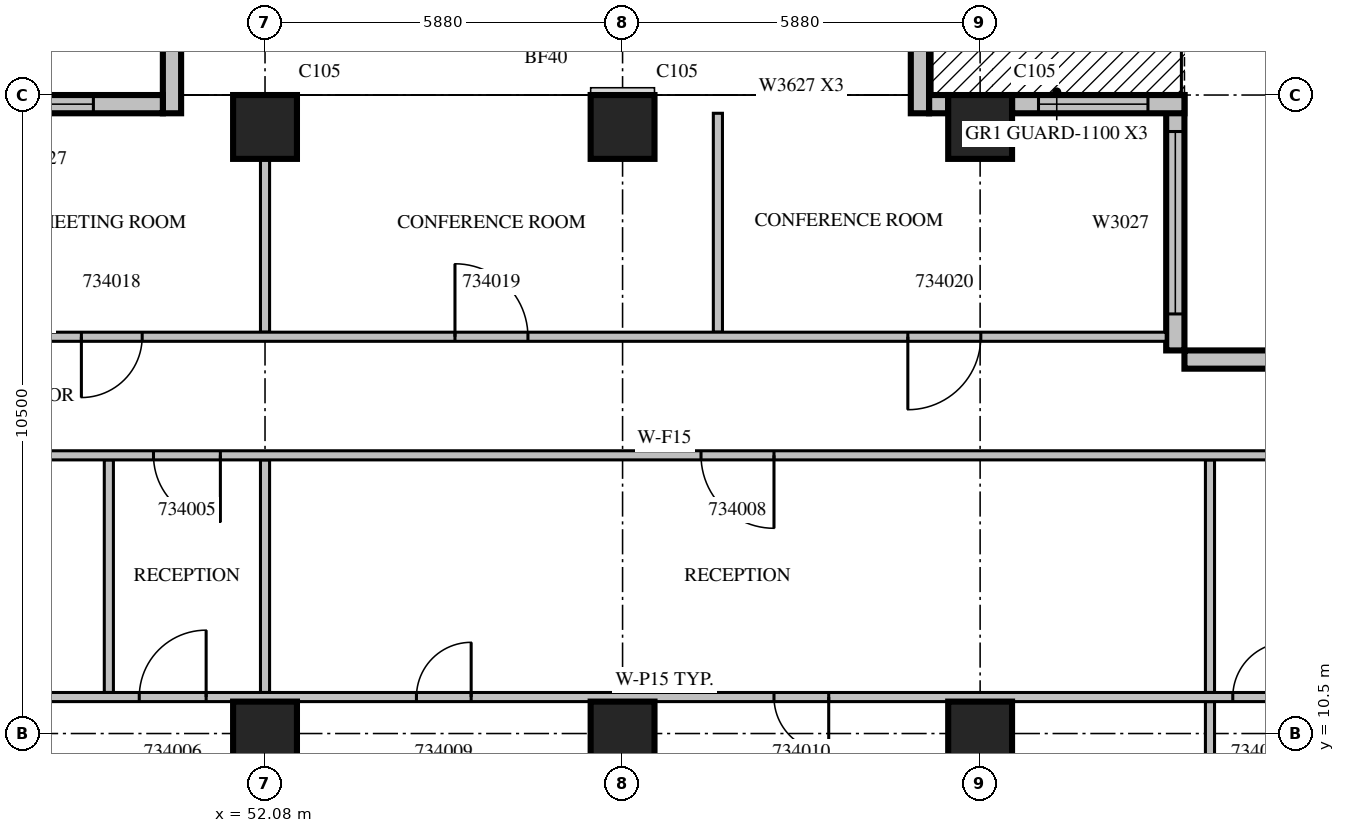
"""IFC4 building model, lengths in metres.
Left out: names, types, materials, properties, quantities, classifications, styles, units other than length and angle.
Written with IfcOpenShell. Run it as: python <this file> out.ifc"""

import sys

from ifc_helpers import new_model, si_unit, direction, frame, frame_2d, origin, origin_2d, place, context, subcontext, project, spatial, rectangle, extrude, source, transform, mapped, element, fill, save


model = new_model("IFC4")
c1 = context("Model", 3, precision=1e-05, world=origin(), true_north=direction((0.0, 1.0)))
c2 = subcontext(c1, "Body", "Model", "MODEL_VIEW")
j1 = project(units=[si_unit("LENGTHUNIT", "METRE"), si_unit("PLANEANGLEUNIT", "RADIAN")], contexts=[c1])
p1 = place(None, origin())
s1 = spatial("IfcSite", under=j1, at=p1, CompositionType="ELEMENT")
p2 = place(p1, origin())
s2 = spatial("IfcBuilding", under=s1, at=p2, CompositionType="ELEMENT")
p3 = place(p2, frame((0.0, 0.0, 153.9)))
s3 = spatial("IfcBuildingStorey", under=s2, at=p3, CompositionType="ELEMENT", Elevation=153.9)
m1 = source(origin(), c2, "Body", "SweptSolid", [
    extrude(rectangle(XDim=1.05, YDim=1.05, at=origin_2d()), origin(), (0.0, 0.0, 1.0), 4.2),
])
for number, where, z_axis, x_axis in (
    (1, (52.08, 10.5, 0.0), (0.0, 0.0, 1.0), (1.0, 0.0, 0.0)),
    (2, (57.96, 10.5, 0.0), (0.0, 0.0, 1.0), (1.0, 0.0, 0.0)),
    (3, (63.84, 10.5, 0.0), (0.0, 0.0, 1.0), (1.0, 0.0, 0.0)),
    (4, (52.08, 20.475, 0.0), (0.0, 0.0, 1.0), (1.0, 0.0, 0.0)),
    (5, (57.96, 20.475, 0.0), (0.0, 0.0, 1.0), (1.0, 0.0, 0.0)),
    (6, (63.84, 20.475, 0.0), (0.0, 0.0, 1.0), (1.0, 0.0, 0.0)),
):
    element("IfcColumn", number, at=place(p3, frame(where, z_axis=z_axis, x_axis=x_axis)), inside=s3, PredefinedType="COLUMN", context=c2, shape_type="MappedRepresentation", body=[
        mapped(m1, transform((0.0, 0.0, 0.0), scale=1.0)),
    ])
m2 = source(origin(), c2, "Body", "SweptSolid", [
    extrude(rectangle(XDim=4.2, YDim=0.3, at=frame_2d((2.1, 0.0))), origin(), (0.0, 0.0, 1.0), 3.8),
])
p4 = place(p3, frame((71.4, 16.65, 0.0), z_axis=(0.0, 0.0, 1.0), x_axis=(-1.0, 0.0, 0.0)))
e7 = element("IfcWall", 7, at=p4, inside=s3, PredefinedType="STANDARD", context=c2, shape_type="MappedRepresentation", body=[
    mapped(m2, transform((0.0, 0.0, 0.0), scale=1.0)),
])
m3 = source(origin(), c2, "Body", "SweptSolid", [
    extrude(rectangle(XDim=1.2, YDim=2.7, at=frame_2d((0.6, 1.35))), frame((0.0, 0.16, 0.0), z_axis=(0.0, -1.0, 0.0), x_axis=(1.0, 0.0, 0.0)), (0.0, 0.0, 1.0), 0.32),
])
p5 = place(p4, frame((0.66, 0.0, 0.6)))
e8 = element("IfcOpeningElement", 8, at=p5, cuts=e7, PredefinedType="OPENING", context=c2, shape_type="MappedRepresentation", body=[
    mapped(m3, transform((0.0, 0.0, 0.0), scale=1.0)),
])
p6 = place(p3, frame((67.05, 16.8, 0.0), z_axis=(0.0, 0.0, 1.0), x_axis=(0.0, 1.0, 0.0)))
e9 = element("IfcWall", 9, at=p6, inside=s3, PredefinedType="STANDARD", context=c2, shape_type="MappedRepresentation", body=[
    mapped(m2, transform((0.0, 0.0, 0.0), scale=1.0)),
])
m4 = source(origin(), c2, "Body", "SweptSolid", [
    extrude(rectangle(XDim=3.0, YDim=2.7, at=frame_2d((1.5, 1.35))), frame((0.0, 0.16, 0.0), z_axis=(0.0, -1.0, 0.0), x_axis=(1.0, 0.0, 0.0)), (0.0, 0.0, 1.0), 0.32),
])
p7 = place(p6, frame((0.6, 0.0, 0.6)))
e10 = element("IfcOpeningElement", 10, at=p7, cuts=e9, PredefinedType="OPENING", context=c2, shape_type="MappedRepresentation", body=[
    mapped(m4, transform((0.0, 0.0, 0.0), scale=1.0)),
])
m5 = source(origin(), c2, "Body", "SweptSolid", [
    extrude(rectangle(XDim=2.835, YDim=0.3, at=frame_2d((1.417, 0.0))), origin(), (0.0, 0.0, 1.0), 3.8),
])
p8 = place(p3, frame((67.2, 20.85, 0.0), z_axis=(0.0, 0.0, 1.0), x_axis=(-1.0, 0.0, 0.0)))
e11 = element("IfcWall", 11, at=p8, inside=s3, PredefinedType="STANDARD", context=c2, shape_type="MappedRepresentation", body=[
    mapped(m5, transform((0.0, 0.0, 0.0), scale=1.0)),
])
m6 = source(origin(), c2, "Body", "SweptSolid", [
    extrude(rectangle(XDim=1.8, YDim=2.4, at=frame_2d((0.9, 1.2))), frame((0.0, 0.16, 0.0), z_axis=(0.0, -1.0, 0.0), x_axis=(1.0, 0.0, 0.0)), (0.0, 0.0, 1.0), 0.32),
])
p9 = place(p8, frame((0.6, 0.0, 0.0)))
e12 = element("IfcOpeningElement", 12, at=p9, cuts=e11, PredefinedType="OPENING", context=c2, shape_type="MappedRepresentation", body=[
    mapped(m6, transform((0.0, 0.0, 0.0), scale=1.0)),
])
m7 = source(origin(), c2, "Body", "SweptSolid", [
    extrude(rectangle(XDim=0.315, YDim=0.3, at=frame_2d((0.158, 0.0))), origin(), (0.0, 0.0, 1.0), 3.8),
])
p10 = place(p3, frame((63.315, 20.85, 0.0), z_axis=(0.0, 0.0, 1.0), x_axis=(-1.0, 0.0, 0.0)))
e13 = element("IfcWall", 13, at=p10, inside=s3, PredefinedType="STANDARD", context=c2, shape_type="MappedRepresentation", body=[
    mapped(m7, transform((0.0, 0.0, 0.0), scale=1.0)),
])
m8 = source(origin(), c2, "Body", "SweptSolid", [
    extrude(rectangle(XDim=1.2, YDim=0.3, at=frame_2d((0.6, 0.0))), origin(), (0.0, 0.0, 1.0), 3.8),
])
for number, where, z_axis, x_axis in (
    (14, (62.85, 20.7, 0.0), (0.0, 0.0, 1.0), (0.0, 1.0, 0.0)),
    (15, (50.55, 20.7, 0.0), (0.0, 0.0, 1.0), (0.0, 1.0, 0.0)),
):
    element("IfcWall", number, at=place(p3, frame(where, z_axis=z_axis, x_axis=x_axis)), inside=s3, PredefinedType="STANDARD", context=c2, shape_type="MappedRepresentation", body=[
        mapped(m8, transform((0.0, 0.0, 0.0), scale=1.0)),
    ])
m9 = source(origin(), c2, "Body", "SweptSolid", [
    extrude(rectangle(XDim=3.675, YDim=0.3, at=frame_2d((1.837, 0.0))), origin(), (0.0, 0.0, 1.0), 3.8),
])
p11 = place(p3, frame((50.4, 20.85, 0.0), z_axis=(0.0, 0.0, 1.0), x_axis=(-1.0, 0.0, 0.0)))
e16 = element("IfcWall", 16, at=p11, inside=s3, PredefinedType="STANDARD", context=c2, shape_type="MappedRepresentation", body=[
    mapped(m9, transform((0.0, 0.0, 0.0), scale=1.0)),
])
m10 = source(origin(), c2, "Body", "SweptSolid", [
    extrude(rectangle(XDim=1.8, YDim=2.7, at=frame_2d((0.9, 1.35))), frame((0.0, 0.16, 0.0), z_axis=(0.0, -1.0, 0.0), x_axis=(1.0, 0.0, 0.0)), (0.0, 0.0, 1.0), 0.32),
])
p12 = place(p11, frame((1.143, 0.0, 0.6)))
e17 = element("IfcOpeningElement", 17, at=p12, cuts=e16, PredefinedType="OPENING", context=c2, shape_type="MappedRepresentation", body=[
    mapped(m10, transform((0.0, 0.0, 0.0), scale=1.0)),
])
m11 = source(origin(), c2, "Body", "SweptSolid", [
    extrude(rectangle(XDim=3.825, YDim=0.15, at=frame_2d((1.913, 0.0))), origin(), (0.0, 0.0, 1.0), 3.8),
])
for number, where, z_axis, x_axis in (
    (18, (49.512, 11.175, 0.0), (0.0, 0.0, 1.0), (0.0, 1.0, 0.0)),
    (19, (52.08, 11.175, 0.0), (0.0, 0.0, 1.0), (0.0, 1.0, 0.0)),
):
    element("IfcWall", number, at=place(p3, frame(where, z_axis=z_axis, x_axis=x_axis)), inside=s3, PredefinedType="PARTITIONING", context=c2, shape_type="MappedRepresentation", body=[
        mapped(m11, transform((0.0, 0.0, 0.0), scale=1.0)),
    ])
m12 = source(origin(), c2, "Body", "SweptSolid", [
    extrude(rectangle(XDim=6.62, YDim=0.15, at=frame_2d((3.31, 0.0))), origin(), (0.0, 0.0, 1.0), 3.8),
])
p13 = place(p3, frame((67.62, 4.405, 0.0), z_axis=(0.0, 0.0, 1.0), x_axis=(0.0, 1.0, 0.0)))
e20 = element("IfcWall", 20, at=p13, inside=s3, PredefinedType="PARTITIONING", context=c2, shape_type="MappedRepresentation", body=[
    mapped(m12, transform((0.0, 0.0, 0.0), scale=1.0)),
])
p14 = place(p3, frame((67.62, 11.175, 0.0), z_axis=(0.0, 0.0, 1.0), x_axis=(0.0, 1.0, 0.0)))
e21 = element("IfcWall", 21, at=p14, inside=s3, PredefinedType="PARTITIONING", context=c2, shape_type="MappedRepresentation", body=[
    mapped(m11, transform((0.0, 0.0, 0.0), scale=1.0)),
])
m13 = source(origin(), c2, "Body", "SweptSolid", [
    extrude(rectangle(XDim=24.9, YDim=0.15, at=frame_2d((12.45, 0.0))), origin(), (0.0, 0.0, 1.0), 3.8),
])
p15 = place(p3, frame((71.1, 11.1, 0.0), z_axis=(0.0, 0.0, 1.0), x_axis=(-1.0, 0.0, 0.0)))
e22 = element("IfcWall", 22, at=p15, inside=s3, PredefinedType="PARTITIONING", context=c2, shape_type="MappedRepresentation", body=[
    mapped(m13, transform((0.0, 0.0, 0.0), scale=1.0)),
])
m14 = source(origin(), c2, "Body", "SweptSolid", [
    extrude(rectangle(XDim=1.1, YDim=2.1, at=frame_2d((0.55, 1.05))), frame((0.0, 0.085, 0.0), z_axis=(0.0, -1.0, 0.0), x_axis=(1.0, 0.0, 0.0)), (0.0, 0.0, 1.0), 0.17),
])
p16 = place(p15, frame((19.988, 0.0, 0.0)))
e23 = element("IfcOpeningElement", 23, at=p16, cuts=e22, PredefinedType="OPENING", context=c2, shape_type="MappedRepresentation", body=[
    mapped(m14, transform((0.0, 0.0, 0.0), scale=1.0)),
])
m15 = source(origin(), c2, "Body", "SweptSolid", [
    extrude(rectangle(XDim=0.9, YDim=2.1, at=frame_2d((0.45, 1.05))), frame((0.0, 0.085, 0.0), z_axis=(0.0, -1.0, 0.0), x_axis=(1.0, 0.0, 0.0)), (0.0, 0.0, 1.0), 0.17),
])
p17 = place(p15, frame((15.63, 0.0, 0.0)))
e24 = element("IfcOpeningElement", 24, at=p17, cuts=e22, PredefinedType="OPENING", context=c2, shape_type="MappedRepresentation", body=[
    mapped(m15, transform((0.0, 0.0, 0.0), scale=1.0)),
])
p18 = place(p15, frame((9.75, 0.0, 0.0)))
e25 = element("IfcOpeningElement", 25, at=p18, cuts=e22, PredefinedType="OPENING", context=c2, shape_type="MappedRepresentation", body=[
    mapped(m15, transform((0.0, 0.0, 0.0), scale=1.0)),
])
p19 = place(p15, frame((2.205, 0.0, 0.0)))
e26 = element("IfcOpeningElement", 26, at=p19, cuts=e22, PredefinedType="OPENING", context=c2, shape_type="MappedRepresentation", body=[
    mapped(m15, transform((0.0, 0.0, 0.0), scale=1.0)),
])
m16 = source(origin(), c2, "Body", "SweptSolid", [
    extrude(rectangle(XDim=3.6, YDim=0.15, at=frame_2d((1.8, 0.0))), origin(), (0.0, 0.0, 1.0), 3.8),
])
p20 = place(p3, frame((59.528, 20.7, 0.0), z_axis=(0.0, 0.0, 1.0), x_axis=(0.0, -1.0, 0.0)))
e27 = element("IfcWall", 27, at=p20, inside=s3, PredefinedType="PARTITIONING", context=c2, shape_type="MappedRepresentation", body=[
    mapped(m16, transform((0.0, 0.0, 0.0), scale=1.0)),
])
m17 = source(origin(), c2, "Body", "SweptSolid", [
    extrude(rectangle(XDim=2.851, YDim=0.15, at=frame_2d((1.425, 0.0))), origin(), (0.0, 0.0, 1.0), 3.8),
])
p21 = place(p3, frame((52.08, 17.1, 0.0), z_axis=(0.0, 0.0, 1.0), x_axis=(0.0, 1.0, 0.0)))
e28 = element("IfcWall", 28, at=p21, inside=s3, PredefinedType="PARTITIONING", context=c2, shape_type="MappedRepresentation", body=[
    mapped(m17, transform((0.0, 0.0, 0.0), scale=1.0)),
])
p22 = place(p3, frame((71.1, 15.075, 0.0), z_axis=(0.0, 0.0, 1.0), x_axis=(-1.0, 0.0, 0.0)))
e29 = element("IfcWall", 29, at=p22, inside=s3, PredefinedType="PARTITIONING", context=c2, shape_type="MappedRepresentation", body=[
    mapped(m13, transform((0.0, 0.0, 0.0), scale=1.0)),
])
p23 = place(p22, frame((19.754, 0.0, 0.0)))
e30 = element("IfcOpeningElement", 30, at=p23, cuts=e29, PredefinedType="OPENING", context=c2, shape_type="MappedRepresentation", body=[
    mapped(m14, transform((0.0, 0.0, 0.0), scale=1.0)),
])
p24 = place(p22, frame((22.794, 0.0, 0.0)))
e31 = element("IfcOpeningElement", 31, at=p24, cuts=e29, PredefinedType="OPENING", context=c2, shape_type="MappedRepresentation", body=[
    mapped(m15, transform((0.0, 0.0, 0.0), scale=1.0)),
])
m18 = source(origin(), c2, "Body", "SweptSolid", [
    extrude(rectangle(XDim=1.2, YDim=2.1, at=frame_2d((0.6, 1.05))), frame((0.0, 0.085, 0.0), z_axis=(0.0, -1.0, 0.0), x_axis=(1.0, 0.0, 0.0)), (0.0, 0.0, 1.0), 0.17),
])
p25 = place(p22, frame((10.65, 0.0, 0.0)))
e32 = element("IfcOpeningElement", 32, at=p25, cuts=e29, PredefinedType="OPENING", context=c2, shape_type="MappedRepresentation", body=[
    mapped(m18, transform((0.0, 0.0, 0.0), scale=1.0)),
])
p26 = place(p22, frame((1.103, 0.0, 0.0)))
e33 = element("IfcOpeningElement", 33, at=p26, cuts=e29, PredefinedType="OPENING", context=c2, shape_type="MappedRepresentation", body=[
    mapped(m18, transform((0.0, 0.0, 0.0), scale=1.0)),
])
m19 = source(origin(), c2, "Body", "SweptSolid", [
    extrude(rectangle(XDim=37.5, YDim=0.15, at=frame_2d((18.75, 0.0))), origin(), (0.0, 0.0, 1.0), 3.8),
])
p27 = place(p3, frame((29.4, 17.025, 0.0), z_axis=(0.0, 0.0, 1.0), x_axis=(1.0, 0.0, 0.0)))
e34 = element("IfcWall", 34, at=p27, inside=s3, PredefinedType="PARTITIONING", context=c2, shape_type="MappedRepresentation", body=[
    mapped(m19, transform((0.0, 0.0, 0.0), scale=1.0)),
])
m20 = source(origin(), c2, "Body", "SweptSolid", [
    extrude(rectangle(XDim=1.0, YDim=2.1, at=frame_2d((0.5, 1.05))), frame((0.0, 0.085, 0.0), z_axis=(0.0, -1.0, 0.0), x_axis=(1.0, 0.0, 0.0)), (0.0, 0.0, 1.0), 0.17),
])
p28 = place(p27, frame((1.357, 0.0, 0.0)))
e35 = element("IfcOpeningElement", 35, at=p28, cuts=e34, PredefinedType="OPENING", context=c2, shape_type="MappedRepresentation", body=[
    mapped(m20, transform((0.0, 0.0, 0.0), scale=1.0)),
])
p29 = place(p27, frame((4.669, 0.0, 0.0)))
e36 = element("IfcOpeningElement", 36, at=p29, cuts=e34, PredefinedType="OPENING", context=c2, shape_type="MappedRepresentation", body=[
    mapped(m20, transform((0.0, 0.0, 0.0), scale=1.0)),
])
p30 = place(p27, frame((7.012, 0.0, 0.0)))
e37 = element("IfcOpeningElement", 37, at=p30, cuts=e34, PredefinedType="OPENING", context=c2, shape_type="MappedRepresentation", body=[
    mapped(m20, transform((0.0, 0.0, 0.0), scale=1.0)),
])
p31 = place(p27, frame((10.05, 0.0, 0.0)))
e38 = element("IfcOpeningElement", 38, at=p31, cuts=e34, PredefinedType="OPENING", context=c2, shape_type="MappedRepresentation", body=[
    mapped(m15, transform((0.0, 0.0, 0.0), scale=1.0)),
])
p32 = place(p27, frame((14.62, 0.0, 0.0)))
e39 = element("IfcOpeningElement", 39, at=p32, cuts=e34, PredefinedType="OPENING", context=c2, shape_type="MappedRepresentation", body=[
    mapped(m20, transform((0.0, 0.0, 0.0), scale=1.0)),
])
p33 = place(p27, frame((19.66, 0.0, 0.0)))
e40 = element("IfcOpeningElement", 40, at=p33, cuts=e34, PredefinedType="OPENING", context=c2, shape_type="MappedRepresentation", body=[
    mapped(m20, transform((0.0, 0.0, 0.0), scale=1.0)),
])
p34 = place(p27, frame((25.804, 0.0, 0.0)))
e41 = element("IfcOpeningElement", 41, at=p34, cuts=e34, PredefinedType="OPENING", context=c2, shape_type="MappedRepresentation", body=[
    mapped(m18, transform((0.0, 0.0, 0.0), scale=1.0)),
])
p35 = place(p27, frame((33.251, 0.0, 0.0)))
e42 = element("IfcOpeningElement", 42, at=p35, cuts=e34, PredefinedType="OPENING", context=c2, shape_type="MappedRepresentation", body=[
    mapped(m18, transform((0.0, 0.0, 0.0), scale=1.0)),
])
m21 = source(origin(), c2, "Body", "SweptSolid", [
    extrude(rectangle(XDim=3.0, YDim=2.7, at=frame_2d((1.5, 1.35))), frame((0.0, 0.03, 0.0), z_axis=(0.0, -1.0, 0.0), x_axis=(1.0, 0.0, 0.0)), (0.0, 0.0, 1.0), 0.06),
])
p36 = place(p7, origin())
e43 = element("IfcWindow", 43, at=p36, inside=s3, PartitioningType="SINGLE_PANEL", PredefinedType="WINDOW", context=c2, shape_type="MappedRepresentation", body=[
    mapped(m21, transform((0.0, 0.0, 0.0), scale=1.0)),
])
fill(e10, e43)
m22 = source(origin(), c2, "Body", "SweptSolid", [
    extrude(rectangle(XDim=1.8, YDim=2.4, at=frame_2d((0.9, 1.2))), frame((0.0, 0.025, 0.0), z_axis=(0.0, -1.0, 0.0), x_axis=(1.0, 0.0, 0.0)), (0.0, 0.0, 1.0), 0.05),
])
p37 = place(p9, origin())
e44 = element("IfcDoor", 44, at=p37, inside=s3, OperationType="SLIDING_TO_LEFT", PredefinedType="DOOR", context=c2, shape_type="MappedRepresentation", body=[
    mapped(m22, transform((0.0, 0.0, 0.0), scale=1.0)),
])
fill(e12, e44)
m23 = source(origin(), c2, "Body", "SweptSolid", [
    extrude(rectangle(XDim=1.8, YDim=2.7, at=frame_2d((0.9, 1.35))), frame((0.0, 0.03, 0.0), z_axis=(0.0, -1.0, 0.0), x_axis=(1.0, 0.0, 0.0)), (0.0, 0.0, 1.0), 0.06),
])
p38 = place(p12, origin())
e45 = element("IfcWindow", 45, at=p38, inside=s3, PartitioningType="SINGLE_PANEL", PredefinedType="WINDOW", context=c2, shape_type="MappedRepresentation", body=[
    mapped(m23, transform((0.0, 0.0, 0.0), scale=1.0)),
])
fill(e17, e45)
m24 = source(origin(), c2, "Body", "SweptSolid", [
    extrude(rectangle(XDim=1.1, YDim=2.1, at=frame_2d((0.55, 1.05))), frame((0.0, 0.025, 0.0), z_axis=(0.0, -1.0, 0.0), x_axis=(1.0, 0.0, 0.0)), (0.0, 0.0, 1.0), 0.05),
])
p39 = place(p23, origin())
e46 = element("IfcDoor", 46, at=p39, inside=s3, OperationType="SINGLE_SWING_LEFT", PredefinedType="DOOR", context=c2, shape_type="MappedRepresentation", body=[
    mapped(m24, transform((0.0, 0.0, 0.0), scale=1.0)),
])
fill(e30, e46)
p40 = place(p16, origin())
e47 = element("IfcDoor", 47, at=p40, inside=s3, OperationType="SINGLE_SWING_RIGHT", PredefinedType="DOOR", context=c2, shape_type="MappedRepresentation", body=[
    mapped(m24, transform((0.0, 0.0, 0.0), scale=1.0)),
])
fill(e23, e47)
m25 = source(origin(), c2, "Body", "SweptSolid", [
    extrude(rectangle(XDim=1.2, YDim=2.1, at=frame_2d((0.6, 1.05))), frame((0.0, 0.025, 0.0), z_axis=(0.0, -1.0, 0.0), x_axis=(1.0, 0.0, 0.0)), (0.0, 0.0, 1.0), 0.05),
])
p41 = place(p25, origin())
e48 = element("IfcDoor", 48, at=p41, inside=s3, OperationType="SINGLE_SWING_LEFT", PredefinedType="DOOR", context=c2, shape_type="MappedRepresentation", body=[
    mapped(m25, transform((0.0, 0.0, 0.0), scale=1.0)),
])
fill(e32, e48)
m26 = source(origin(), c2, "Body", "SweptSolid", [
    extrude(rectangle(XDim=0.9, YDim=2.1, at=frame_2d((0.45, 1.05))), frame((0.0, 0.025, 0.0), z_axis=(0.0, -1.0, 0.0), x_axis=(1.0, 0.0, 0.0)), (0.0, 0.0, 1.0), 0.05),
])
p42 = place(p17, origin())
e49 = element("IfcDoor", 49, at=p42, inside=s3, OperationType="SINGLE_SWING_RIGHT", PredefinedType="DOOR", context=c2, shape_type="MappedRepresentation", body=[
    mapped(m26, transform((0.0, 0.0, 0.0), scale=1.0)),
])
fill(e24, e49)
p43 = place(p18, origin())
e50 = element("IfcDoor", 50, at=p43, inside=s3, OperationType="SINGLE_SWING_LEFT", PredefinedType="DOOR", context=c2, shape_type="MappedRepresentation", body=[
    mapped(m26, transform((0.0, 0.0, 0.0), scale=1.0)),
])
fill(e25, e50)
p44 = place(p19, origin())
e51 = element("IfcDoor", 51, at=p44, inside=s3, OperationType="SINGLE_SWING_RIGHT", PredefinedType="DOOR", context=c2, shape_type="MappedRepresentation", body=[
    mapped(m26, transform((0.0, 0.0, 0.0), scale=1.0)),
])
fill(e26, e51)
m27 = source(origin(), c2, "Body", "SweptSolid", [
    extrude(rectangle(XDim=1.0, YDim=2.1, at=frame_2d((0.5, 1.05))), frame((0.0, 0.025, 0.0), z_axis=(0.0, -1.0, 0.0), x_axis=(1.0, 0.0, 0.0)), (0.0, 0.0, 1.0), 0.05),
])
p45 = place(p33, origin())
e52 = element("IfcDoor", 52, at=p45, inside=s3, OperationType="SINGLE_SWING_RIGHT", PredefinedType="DOOR", context=c2, shape_type="MappedRepresentation", body=[
    mapped(m27, transform((0.0, 0.0, 0.0), scale=1.0)),
])
fill(e40, e52)
p46 = place(p34, origin())
e53 = element("IfcDoor", 53, at=p46, inside=s3, OperationType="SINGLE_SWING_LEFT", PredefinedType="DOOR", context=c2, shape_type="MappedRepresentation", body=[
    mapped(m25, transform((0.0, 0.0, 0.0), scale=1.0)),
])
fill(e41, e53)
p47 = place(p35, origin())
e54 = element("IfcDoor", 54, at=p47, inside=s3, OperationType="SINGLE_SWING_RIGHT", PredefinedType="DOOR", context=c2, shape_type="MappedRepresentation", body=[
    mapped(m25, transform((0.0, 0.0, 0.0), scale=1.0)),
])
fill(e42, e54)
save(model, sys.argv[1])
